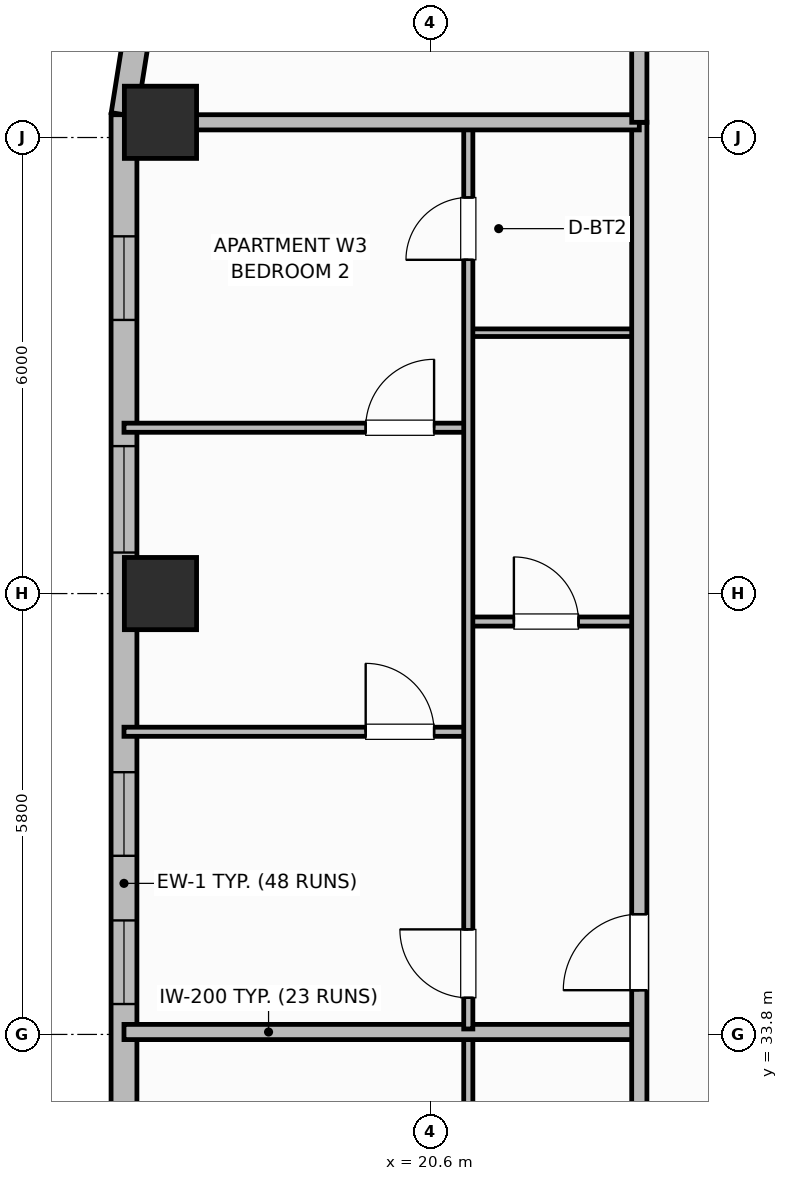
"""IFC4 building model, lengths in metres.
Left out: names, types, materials, properties, quantities, classifications, styles, units other than length and angle.
Written with IfcOpenShell. Run it as: python <this file> out.ifc"""

import sys

from ifc_helpers import new_model, si_unit, direction, frame, frame_2d, origin, origin_2d, place, context, subcontext, project, spatial, rectangle, extrude, element, fill, save


model = new_model("IFC4")
c1 = context("Model", 3, precision=1e-05, world=origin(), true_north=direction((0.0, 1.0)))
c2 = subcontext(c1, "Body", "Model", "MODEL_VIEW")
j1 = project(units=[si_unit("LENGTHUNIT", "METRE"), si_unit("PLANEANGLEUNIT", "RADIAN")], contexts=[c1])
p1 = place(None, origin())
s1 = spatial("IfcSite", under=j1, at=p1, CompositionType="ELEMENT")
p2 = place(p1, origin())
s2 = spatial("IfcBuilding", under=s1, at=p2, CompositionType="ELEMENT")
p3 = place(p2, frame((0.0, 0.0, 158.9)))
s3 = spatial("IfcBuildingStorey", under=s2, at=p3, CompositionType="ELEMENT", Elevation=158.9)
for number, where, z_axis, x_axis in (
    (1, (17.05, 39.6, 0.0), (0.0, 0.0, 1.0), (1.0, 0.0, 0.0)),
    (2, (17.05, 45.8, 0.0), (0.0, 0.0, 1.0), (1.0, 0.0, 0.0)),
):
    element("IfcColumn", number, at=place(p3, frame(where, z_axis=z_axis, x_axis=x_axis)), inside=s3, PredefinedType="COLUMN", context=c2, shape_type="SweptSolid", body=[
        extrude(rectangle(XDim=0.95, YDim=0.95, at=origin_2d()), origin(), (0.0, 0.0, 1.0), 3.7),
    ])
p4 = place(p3, frame((16.748, 47.022, 0.0), z_axis=(0.0, 0.0, 1.0), x_axis=(-0.156481329164, -0.987680916907, 0.0)))
e3 = element("IfcWall", 3, at=p4, inside=s3, PredefinedType="SOLIDWALL", context=c2, shape_type="SweptSolid", body=[
    extrude(rectangle(XDim=1.136, YDim=0.34, at=frame_2d((0.568, 0.0))), origin(), (0.0, 0.0, 1.0), 2.72),
])
p5 = place(p3, frame((16.57, 45.9, 0.0), z_axis=(0.0, 0.0, 1.0), x_axis=(0.0, -1.0, 0.0)))
e4 = element("IfcWall", 4, at=p5, inside=s3, PredefinedType="SOLIDWALL", context=c2, shape_type="SweptSolid", body=[
    extrude(rectangle(XDim=13.3, YDim=0.34, at=frame_2d((6.65, 0.0))), origin(), (0.0, 0.0, 1.0), 2.72),
])
p6 = place(p5, frame((1.6, 0.0, 0.95)))
e5 = element("IfcOpeningElement", 5, at=p6, cuts=e4, PredefinedType="OPENING", context=c2, shape_type="SweptSolid", body=[
    extrude(rectangle(XDim=1.1, YDim=1.65, at=frame_2d((0.55, 0.825))), frame((0.0, 0.18, 0.0), z_axis=(0.0, -1.0, 0.0), x_axis=(1.0, 0.0, 0.0)), (0.0, 0.0, 1.0), 0.36),
])
p7 = place(p5, frame((4.36, 0.0, 0.71)))
e6 = element("IfcOpeningElement", 6, at=p7, cuts=e4, PredefinedType="OPENING", context=c2, shape_type="SweptSolid", body=[
    extrude(rectangle(XDim=1.4, YDim=1.85, at=frame_2d((0.7, 0.925))), frame((0.0, 0.18, 0.0), z_axis=(0.0, -1.0, 0.0), x_axis=(1.0, 0.0, 0.0)), (0.0, 0.0, 1.0), 0.36),
])
p8 = place(p5, frame((8.65, 0.0, 0.95)))
e7 = element("IfcOpeningElement", 7, at=p8, cuts=e4, PredefinedType="OPENING", context=c2, shape_type="SweptSolid", body=[
    extrude(rectangle(XDim=1.1, YDim=1.65, at=frame_2d((0.55, 0.825))), frame((0.0, 0.18, 0.0), z_axis=(0.0, -1.0, 0.0), x_axis=(1.0, 0.0, 0.0)), (0.0, 0.0, 1.0), 0.36),
])
p9 = place(p5, frame((10.6, 0.0, 0.95)))
e8 = element("IfcOpeningElement", 8, at=p9, cuts=e4, PredefinedType="OPENING", context=c2, shape_type="SweptSolid", body=[
    extrude(rectangle(XDim=1.1, YDim=1.65, at=frame_2d((0.55, 0.825))), frame((0.0, 0.18, 0.0), z_axis=(0.0, -1.0, 0.0), x_axis=(1.0, 0.0, 0.0)), (0.0, 0.0, 1.0), 0.36),
])
p10 = place(p3, frame((21.1, 22.74, 0.0), z_axis=(0.0, 0.0, 1.0), x_axis=(0.0, 1.0, 0.0)))
e9 = element("IfcWall", 9, at=p10, inside=s3, PredefinedType="PARTITIONING", context=c2, shape_type="SweptSolid", body=[
    extrude(rectangle(XDim=11.052, YDim=0.12, at=frame_2d((5.526, 0.0))), origin(), (0.0, 0.0, 1.0), 2.55),
])
p11 = place(p10, frame((0.41, 0.0, 0.0)))
e10 = element("IfcOpeningElement", 10, at=p11, cuts=e9, PredefinedType="OPENING", context=c2, shape_type="SweptSolid", body=[
    extrude(rectangle(XDim=0.9, YDim=2.1, at=frame_2d((0.45, 1.05))), frame((0.0, 0.07, 0.0), z_axis=(0.0, -1.0, 0.0), x_axis=(1.0, 0.0, 0.0)), (0.0, 0.0, 1.0), 0.14),
])
p12 = place(p3, frame((16.57, 33.832, 0.0), z_axis=(0.0, 0.0, 1.0), x_axis=(1.0, 0.0, 0.0)))
e11 = element("IfcWall", 11, at=p12, inside=s3, PredefinedType="PARTITIONING", context=c2, shape_type="SweptSolid", body=[
    extrude(rectangle(XDim=6.78, YDim=0.2, at=frame_2d((3.39, 0.0))), origin(), (0.0, 0.0, 1.0), 2.55),
])
p13 = place(p3, frame((21.1, 39.232, 0.0), z_axis=(0.0, 0.0, 1.0), x_axis=(1.0, 0.0, 0.0)))
e12 = element("IfcWall", 12, at=p13, inside=s3, PredefinedType="PARTITIONING", context=c2, shape_type="SweptSolid", body=[
    extrude(rectangle(XDim=2.25, YDim=0.12, at=frame_2d((1.125, 0.0))), origin(), (0.0, 0.0, 1.0), 2.55),
])
p14 = place(p13, frame((0.6, 0.0, 0.0)))
e13 = element("IfcOpeningElement", 13, at=p14, cuts=e12, PredefinedType="OPENING", context=c2, shape_type="SweptSolid", body=[
    extrude(rectangle(XDim=0.85, YDim=2.1, at=frame_2d((0.425, 1.05))), frame((0.0, 0.07, 0.0), z_axis=(0.0, -1.0, 0.0), x_axis=(1.0, 0.0, 0.0)), (0.0, 0.0, 1.0), 0.14),
])
p15 = place(p3, frame((21.1, 43.032, 0.0), z_axis=(0.0, 0.0, 1.0), x_axis=(1.0, 0.0, 0.0)))
e14 = element("IfcWall", 14, at=p15, inside=s3, PredefinedType="PARTITIONING", context=c2, shape_type="SweptSolid", body=[
    extrude(rectangle(XDim=2.25, YDim=0.1, at=frame_2d((1.125, 0.0))), origin(), (0.0, 0.0, 1.0), 2.55),
])
p16 = place(p3, frame((16.57, 37.782, 0.0), z_axis=(0.0, 0.0, 1.0), x_axis=(1.0, 0.0, 0.0)))
e15 = element("IfcWall", 15, at=p16, inside=s3, PredefinedType="PARTITIONING", context=c2, shape_type="SweptSolid", body=[
    extrude(rectangle(XDim=4.53, YDim=0.12, at=frame_2d((2.265, 0.0))), origin(), (0.0, 0.0, 1.0), 2.55),
])
p17 = place(p16, frame((3.18, 0.0, 0.0)))
e16 = element("IfcOpeningElement", 16, at=p17, cuts=e15, PredefinedType="OPENING", context=c2, shape_type="SweptSolid", body=[
    extrude(rectangle(XDim=0.9, YDim=2.1, at=frame_2d((0.45, 1.05))), frame((0.0, 0.07, 0.0), z_axis=(0.0, -1.0, 0.0), x_axis=(1.0, 0.0, 0.0)), (0.0, 0.0, 1.0), 0.14),
])
p18 = place(p3, frame((16.57, 41.782, 0.0), z_axis=(0.0, 0.0, 1.0), x_axis=(1.0, 0.0, 0.0)))
e17 = element("IfcWall", 17, at=p18, inside=s3, PredefinedType="PARTITIONING", context=c2, shape_type="SweptSolid", body=[
    extrude(rectangle(XDim=4.53, YDim=0.12, at=frame_2d((2.265, 0.0))), origin(), (0.0, 0.0, 1.0), 2.55),
])
p19 = place(p18, frame((3.18, 0.0, 0.0)))
e18 = element("IfcOpeningElement", 18, at=p19, cuts=e17, PredefinedType="OPENING", context=c2, shape_type="SweptSolid", body=[
    extrude(rectangle(XDim=0.9, YDim=2.1, at=frame_2d((0.45, 1.05))), frame((0.0, 0.07, 0.0), z_axis=(0.0, -1.0, 0.0), x_axis=(1.0, 0.0, 0.0)), (0.0, 0.0, 1.0), 0.14),
])
p20 = place(p3, frame((21.1, 33.872, 0.0), z_axis=(0.0, 0.0, 1.0), x_axis=(0.0, 1.0, 0.0)))
e19 = element("IfcWall", 19, at=p20, inside=s3, PredefinedType="PARTITIONING", context=c2, shape_type="SweptSolid", body=[
    extrude(rectangle(XDim=11.888, YDim=0.12, at=frame_2d((5.944, 0.0))), origin(), (0.0, 0.0, 1.0), 2.55),
])
p21 = place(p20, frame((0.41, 0.0, 0.0)))
e20 = element("IfcOpeningElement", 20, at=p21, cuts=e19, PredefinedType="OPENING", context=c2, shape_type="SweptSolid", body=[
    extrude(rectangle(XDim=0.9, YDim=2.1, at=frame_2d((0.45, 1.05))), frame((0.0, 0.07, 0.0), z_axis=(0.0, -1.0, 0.0), x_axis=(1.0, 0.0, 0.0)), (0.0, 0.0, 1.0), 0.14),
])
p22 = place(p20, frame((10.119, 0.0, 0.0)))
e21 = element("IfcOpeningElement", 21, at=p22, cuts=e19, PredefinedType="OPENING", context=c2, shape_type="SweptSolid", body=[
    extrude(rectangle(XDim=0.82, YDim=2.08, at=frame_2d((0.41, 1.04))), frame((0.0, 0.07, 0.0), z_axis=(0.0, -1.0, 0.0), x_axis=(1.0, 0.0, 0.0)), (0.0, 0.0, 1.0), 0.14),
])
p23 = place(p3, frame((23.35, 10.6, 0.0), z_axis=(0.0, 0.0, 1.0), x_axis=(0.0, 1.0, 0.0)))
e22 = element("IfcWall", 22, at=p23, inside=s3, PredefinedType="PARTITIONING", context=c2, shape_type="SweptSolid", body=[
    extrude(rectangle(XDim=35.2, YDim=0.2, at=frame_2d((17.6, 0.0))), origin(), (0.0, 0.0, 1.0), 2.55),
])
p24 = place(p23, frame((2.65, 0.0, 0.0)))
e23 = element("IfcOpeningElement", 23, at=p24, cuts=e22, PredefinedType="OPENING", context=c2, shape_type="SweptSolid", body=[
    extrude(rectangle(XDim=1.0, YDim=2.15, at=frame_2d((0.5, 1.075))), frame((0.0, 0.11, 0.0), z_axis=(0.0, -1.0, 0.0), x_axis=(1.0, 0.0, 0.0)), (0.0, 0.0, 1.0), 0.22),
])
p25 = place(p23, frame((12.65, 0.0, 0.0)))
e24 = element("IfcOpeningElement", 24, at=p25, cuts=e22, PredefinedType="OPENING", context=c2, shape_type="SweptSolid", body=[
    extrude(rectangle(XDim=1.0, YDim=2.15, at=frame_2d((0.5, 1.075))), frame((0.0, 0.11, 0.0), z_axis=(0.0, -1.0, 0.0), x_axis=(1.0, 0.0, 0.0)), (0.0, 0.0, 1.0), 0.22),
])
p26 = place(p23, frame((23.782, 0.0, 0.0)))
e25 = element("IfcOpeningElement", 25, at=p26, cuts=e22, PredefinedType="OPENING", context=c2, shape_type="SweptSolid", body=[
    extrude(rectangle(XDim=1.0, YDim=2.15, at=frame_2d((0.5, 1.075))), frame((0.0, 0.11, 0.0), z_axis=(0.0, -1.0, 0.0), x_axis=(1.0, 0.0, 0.0)), (0.0, 0.0, 1.0), 0.22),
])
p27 = place(p3, frame((16.99, 45.8, 0.0), z_axis=(0.0, 0.0, 1.0), x_axis=(1.0, 0.0, 0.0)))
e26 = element("IfcWall", 26, at=p27, inside=s3, PredefinedType="PARTITIONING", context=c2, shape_type="SweptSolid", body=[
    extrude(rectangle(XDim=6.36, YDim=0.2, at=frame_2d((3.18, 0.0))), origin(), (0.0, 0.0, 1.0), 2.55),
])
p28 = place(p3, frame((23.35, 45.8, 0.0), z_axis=(0.0, 0.0, 1.0), x_axis=(0.0, 1.0, 0.0)))
e27 = element("IfcWall", 27, at=p28, inside=s3, PredefinedType="PARTITIONING", context=c2, shape_type="SweptSolid", body=[
    extrude(rectangle(XDim=3.73, YDim=0.2, at=frame_2d((1.865, 0.0))), origin(), (0.0, 0.0, 1.0), 2.55),
])
p29 = place(p6, origin())
e28 = element("IfcWindow", 28, at=p29, inside=s3, PartitioningType="SINGLE_PANEL", PredefinedType="WINDOW", context=c2, shape_type="SweptSolid", body=[
    extrude(rectangle(XDim=1.1, YDim=1.65, at=frame_2d((0.55, 0.825))), frame((0.0, 0.03, 0.0), z_axis=(0.0, -1.0, 0.0), x_axis=(1.0, 0.0, 0.0)), (0.0, 0.0, 1.0), 0.06),
])
fill(e5, e28)
p30 = place(p7, origin())
e29 = element("IfcWindow", 29, at=p30, inside=s3, PartitioningType="SINGLE_PANEL", PredefinedType="WINDOW", context=c2, shape_type="SweptSolid", body=[
    extrude(rectangle(XDim=1.4, YDim=1.85, at=frame_2d((0.7, 0.925))), frame((0.0, 0.03, 0.0), z_axis=(0.0, -1.0, 0.0), x_axis=(1.0, 0.0, 0.0)), (0.0, 0.0, 1.0), 0.06),
])
fill(e6, e29)
p31 = place(p8, origin())
e30 = element("IfcWindow", 30, at=p31, inside=s3, PartitioningType="SINGLE_PANEL", PredefinedType="WINDOW", context=c2, shape_type="SweptSolid", body=[
    extrude(rectangle(XDim=1.1, YDim=1.65, at=frame_2d((0.55, 0.825))), frame((0.0, 0.03, 0.0), z_axis=(0.0, -1.0, 0.0), x_axis=(1.0, 0.0, 0.0)), (0.0, 0.0, 1.0), 0.06),
])
fill(e7, e30)
p32 = place(p9, origin())
e31 = element("IfcWindow", 31, at=p32, inside=s3, PartitioningType="SINGLE_PANEL", PredefinedType="WINDOW", context=c2, shape_type="SweptSolid", body=[
    extrude(rectangle(XDim=1.1, YDim=1.65, at=frame_2d((0.55, 0.825))), frame((0.0, 0.03, 0.0), z_axis=(0.0, -1.0, 0.0), x_axis=(1.0, 0.0, 0.0)), (0.0, 0.0, 1.0), 0.06),
])
fill(e8, e31)
p33 = place(p14, origin())
e32 = element("IfcDoor", 32, at=p33, inside=s3, OperationType="SINGLE_SWING_LEFT", PredefinedType="DOOR", context=c2, shape_type="SweptSolid", body=[
    extrude(rectangle(XDim=0.85, YDim=2.1, at=frame_2d((0.425, 1.05))), frame((0.0, 0.025, 0.0), z_axis=(0.0, -1.0, 0.0), x_axis=(1.0, 0.0, 0.0)), (0.0, 0.0, 1.0), 0.05),
])
fill(e13, e32)
p34 = place(p17, origin())
e33 = element("IfcDoor", 33, at=p34, inside=s3, OperationType="SINGLE_SWING_LEFT", PredefinedType="DOOR", context=c2, shape_type="SweptSolid", body=[
    extrude(rectangle(XDim=0.9, YDim=2.1, at=frame_2d((0.45, 1.05))), frame((0.0, 0.025, 0.0), z_axis=(0.0, -1.0, 0.0), x_axis=(1.0, 0.0, 0.0)), (0.0, 0.0, 1.0), 0.05),
])
fill(e16, e33)
p35 = place(p19, origin())
e34 = element("IfcDoor", 34, at=p35, inside=s3, OperationType="SINGLE_SWING_RIGHT", PredefinedType="DOOR", context=c2, shape_type="SweptSolid", body=[
    extrude(rectangle(XDim=0.9, YDim=2.1, at=frame_2d((0.45, 1.05))), frame((0.0, 0.025, 0.0), z_axis=(0.0, -1.0, 0.0), x_axis=(1.0, 0.0, 0.0)), (0.0, 0.0, 1.0), 0.05),
])
fill(e18, e34)
p36 = place(p21, origin())
e35 = element("IfcDoor", 35, at=p36, inside=s3, OperationType="SINGLE_SWING_RIGHT", PredefinedType="DOOR", context=c2, shape_type="SweptSolid", body=[
    extrude(rectangle(XDim=0.9, YDim=2.1, at=frame_2d((0.45, 1.05))), frame((0.0, 0.025, 0.0), z_axis=(0.0, -1.0, 0.0), x_axis=(1.0, 0.0, 0.0)), (0.0, 0.0, 1.0), 0.05),
])
fill(e20, e35)
p37 = place(p22, origin())
e36 = element("IfcDoor", 36, at=p37, inside=s3, OperationType="SINGLE_SWING_LEFT", PredefinedType="DOOR", context=c2, shape_type="SweptSolid", body=[
    extrude(rectangle(XDim=0.82, YDim=2.08, at=frame_2d((0.41, 1.04))), frame((0.0, 0.025, 0.0), z_axis=(0.0, -1.0, 0.0), x_axis=(1.0, 0.0, 0.0)), (0.0, 0.0, 1.0), 0.05),
])
fill(e21, e36)
p38 = place(p26, origin())
e37 = element("IfcDoor", 37, at=p38, inside=s3, OperationType="SINGLE_SWING_LEFT", PredefinedType="DOOR", context=c2, shape_type="SweptSolid", body=[
    extrude(rectangle(XDim=1.0, YDim=2.15, at=frame_2d((0.5, 1.075))), frame((0.0, 0.025, 0.0), z_axis=(0.0, -1.0, 0.0), x_axis=(1.0, 0.0, 0.0)), (0.0, 0.0, 1.0), 0.05),
])
fill(e25, e37)
save(model, sys.argv[1])
